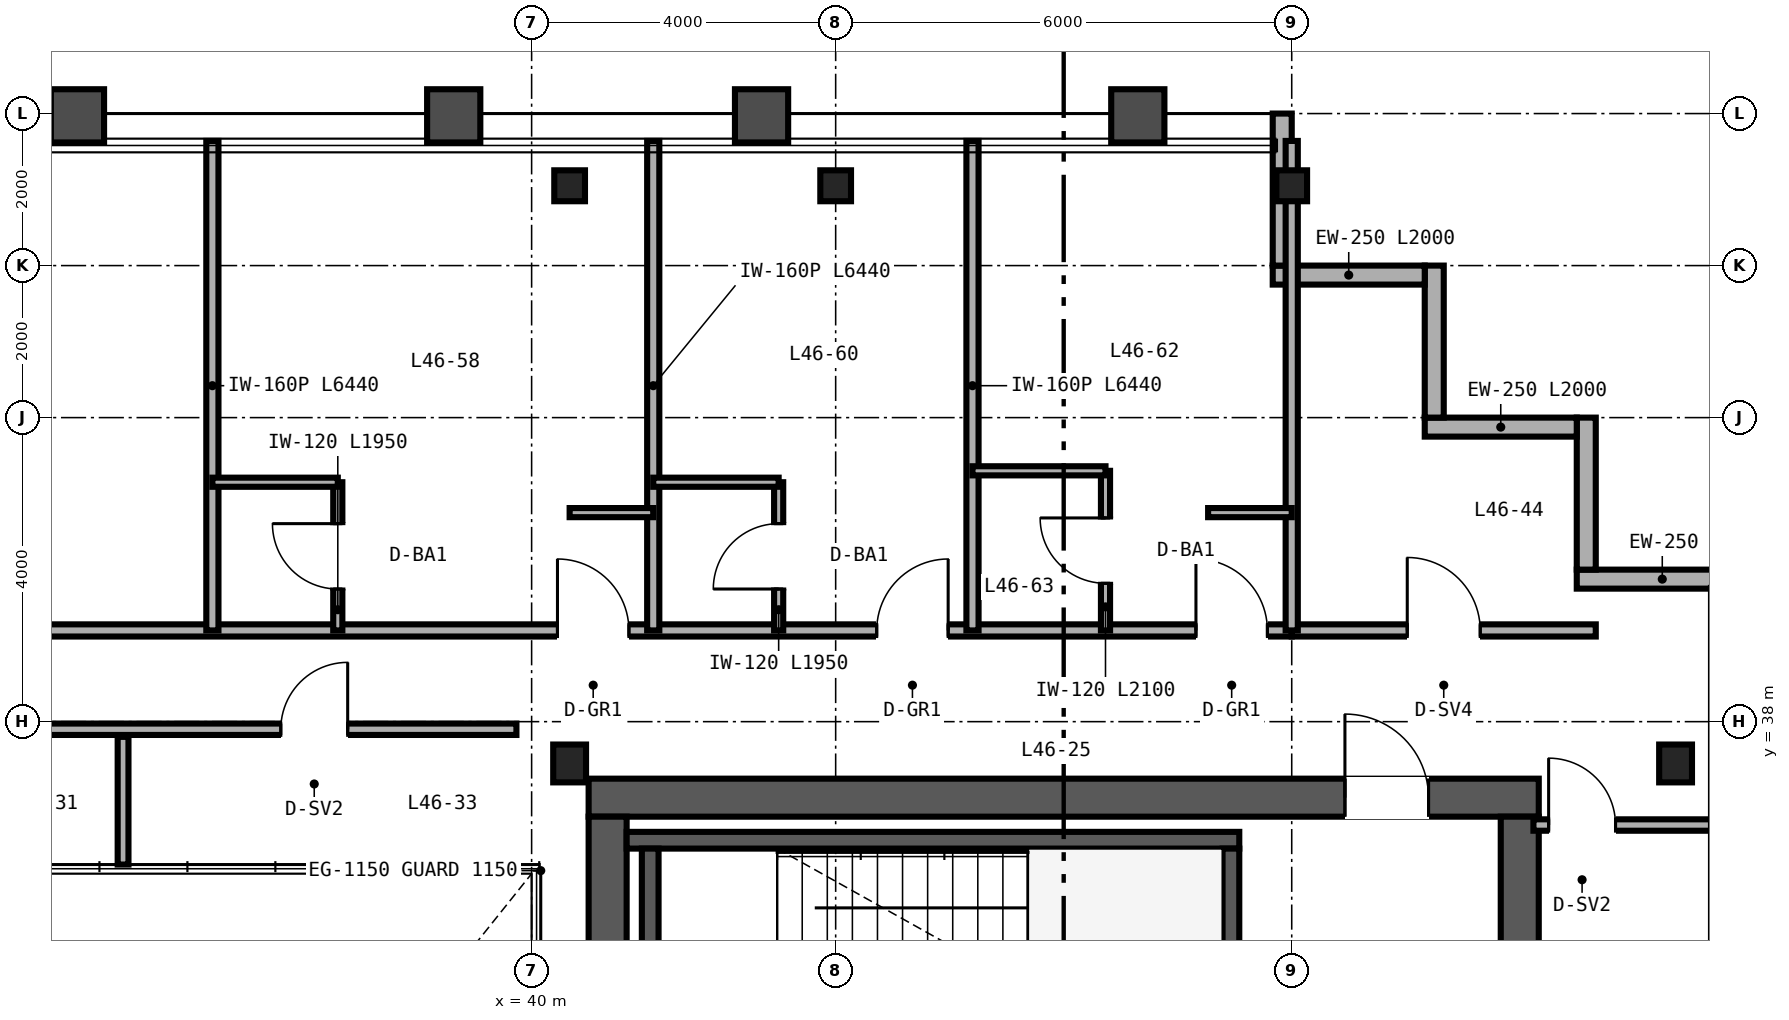
"""IFC4 building model, lengths in metres.
Left out: names, types, materials, properties, quantities, classifications, styles, units other than length and angle.
Written with IfcOpenShell. Run it as: python <this file> out.ifc"""

import sys

from ifc_helpers import new_model, si_unit, direction, frame, frame_2d, origin, origin_2d, place, context, subcontext, project, spatial, rectangle, i_section, extrude, source, transform, mapped, element, fill, save


model = new_model("IFC4")
c1 = context("Model", 3, precision=1e-05, world=origin(), true_north=direction((0.0, 1.0)))
c2 = subcontext(c1, "Body", "Model", "MODEL_VIEW")
j1 = project(units=[si_unit("LENGTHUNIT", "METRE"), si_unit("PLANEANGLEUNIT", "RADIAN")], contexts=[c1])
p1 = place(None, origin())
s1 = spatial("IfcSite", under=j1, at=p1, CompositionType="ELEMENT")
p2 = place(p1, origin())
s2 = spatial("IfcBuilding", under=s1, at=p2, CompositionType="ELEMENT")
p3 = place(p2, frame((0.0, 0.0, 184.8)))
s3 = spatial("IfcBuildingStorey", under=s2, at=p3, CompositionType="ELEMENT", Elevation=184.8)
p4 = place(p3, frame((40.75, 37.0, 0.0), z_axis=(0.0, 0.0, 1.0), x_axis=(1.0, 0.0, 0.0)))
e1 = element("IfcWall", 1, at=p4, inside=s3, PredefinedType="SHEAR", context=c2, shape_type="SweptSolid", body=[
    extrude(rectangle(XDim=12.5, YDim=0.5, at=frame_2d((6.25, 0.0))), origin(), (0.0, 0.0, 1.0), 3.37),
])
p5 = place(p4, frame((9.95, 0.0, 0.0)))
e2 = element("IfcOpeningElement", 2, at=p5, cuts=e1, PredefinedType="OPENING", context=c2, shape_type="SweptSolid", body=[
    extrude(rectangle(XDim=1.1, YDim=2.15, at=frame_2d((0.55, 1.075))), frame((0.0, 0.26, 0.0), z_axis=(0.0, -1.0, 0.0), x_axis=(1.0, 0.0, 0.0)), (0.0, 0.0, 1.0), 0.52),
])
for number, where, z_axis, x_axis in (
    (3, (41.0, 15.25, 0.0), (0.0, 0.0, 1.0), (0.0, 1.0, 0.0)),
    (4, (53.0, 15.25, 0.0), (0.0, 0.0, 1.0), (0.0, 1.0, 0.0)),
):
    element("IfcWall", number, at=place(p3, frame(where, z_axis=z_axis, x_axis=x_axis)), inside=s3, PredefinedType="SHEAR", context=c2, shape_type="SweptSolid", body=[
        extrude(rectangle(XDim=21.5, YDim=0.5, at=frame_2d((10.75, 0.0))), origin(), (0.0, 0.0, 1.0), 3.37),
    ])
p6 = place(p3, frame((41.25, 36.44, 0.0), z_axis=(0.0, 0.0, 1.0), x_axis=(1.0, 0.0, 0.0)))
e5 = element("IfcWall", 5, at=p6, inside=s3, PredefinedType="SHEAR", context=c2, shape_type="SweptSolid", body=[
    extrude(rectangle(XDim=8.06, YDim=0.22, at=frame_2d((4.03, 0.0))), origin(), (0.0, 0.0, 1.0), 3.4),
])
for number, where, z_axis, x_axis in (
    (6, (41.56, 33.05, 0.0), (0.0, 0.0, 1.0), (0.0, 1.0, 0.0)),
    (7, (49.2, 33.05, 0.0), (0.0, 0.0, 1.0), (0.0, 1.0, 0.0)),
):
    element("IfcWall", number, at=place(p3, frame(where, z_axis=z_axis, x_axis=x_axis)), inside=s3, PredefinedType="SHEAR", context=c2, shape_type="SweptSolid", body=[
        extrude(rectangle(XDim=3.28, YDim=0.22, at=frame_2d((1.64, 0.0))), origin(), (0.0, 0.0, 1.0), 3.4),
    ])
m1 = source(origin(), c2, "Body", "SweptSolid", [
    extrude(i_section(OverallWidth=0.432, OverallDepth=0.498, WebThickness=0.056, FlangeThickness=0.089, FilletRadius=0.025, at=origin_2d()), origin(), (0.0, 0.0, 1.0), 3.37),
])
for number, where, z_axis, x_axis in (
    (8, (40.5, 37.45, 0.0), (0.0, 0.0, 1.0), (1.0, 0.0, 0.0)),
    (9, (55.05, 37.45, 0.0), (0.0, 0.0, 1.0), (1.0, 0.0, 0.0)),
):
    element("IfcColumn", number, at=place(p3, frame(where, z_axis=z_axis, x_axis=x_axis)), inside=s3, PredefinedType="COLUMN", context=c2, shape_type="MappedRepresentation", body=[
        mapped(m1, transform((0.0, 0.0, 0.0), scale=1.0)),
    ])
m2 = source(origin(), c2, "Body", "SweptSolid", [
    extrude(i_section(OverallWidth=0.404, OverallDepth=0.407, WebThickness=0.027, FlangeThickness=0.044, FilletRadius=0.025, at=origin_2d()), origin(), (0.0, 0.0, 1.0), 3.37),
])
for number, where, z_axis, x_axis in (
    (10, (40.5, 45.05, 0.0), (0.0, 0.0, 1.0), (1.0, 0.0, 0.0)),
    (11, (44.0, 45.05, 0.0), (0.0, 0.0, 1.0), (1.0, 0.0, 0.0)),
    (12, (50.0, 45.05, 0.0), (0.0, 0.0, 1.0), (1.0, 0.0, 0.0)),
):
    element("IfcColumn", number, at=place(p3, frame(where, z_axis=z_axis, x_axis=x_axis)), inside=s3, PredefinedType="COLUMN", context=c2, shape_type="MappedRepresentation", body=[
        mapped(m2, transform((0.0, 0.0, 0.0), scale=1.0)),
    ])
p7 = place(p3, frame((56.0, 39.875, 0.0), z_axis=(0.0, 0.0, 1.0), x_axis=(-1.0, 0.0, 0.0)))
e13 = element("IfcWall", 13, at=p7, inside=s3, PredefinedType="SOLIDWALL", context=c2, shape_type="SweptSolid", body=[
    extrude(rectangle(XDim=2.25, YDim=0.25, at=frame_2d((1.125, 0.0))), origin(), (0.0, 0.0, 1.0), 3.37),
])
for number, where, z_axis, x_axis in (
    (14, (53.875, 40.0, 0.0), (0.0, 0.0, 1.0), (0.0, 1.0, 0.0)),
    (15, (53.75, 41.875, 0.0), (0.0, 0.0, 1.0), (-1.0, 0.0, 0.0)),
    (16, (51.875, 42.0, 0.0), (0.0, 0.0, 1.0), (0.0, 1.0, 0.0)),
    (17, (51.75, 43.875, 0.0), (0.0, 0.0, 1.0), (-1.0, 0.0, 0.0)),
):
    element("IfcWall", number, at=place(p3, frame(where, z_axis=z_axis, x_axis=x_axis)), inside=s3, PredefinedType="SOLIDWALL", context=c2, shape_type="SweptSolid", body=[
        extrude(rectangle(XDim=2.0, YDim=0.25, at=frame_2d((1.0, 0.0))), origin(), (0.0, 0.0, 1.0), 3.37),
    ])
p8 = place(p3, frame((49.875, 44.0, 0.0), z_axis=(0.0, 0.0, 1.0), x_axis=(0.0, 1.0, 0.0)))
e18 = element("IfcWall", 18, at=p8, inside=s3, PredefinedType="SOLIDWALL", context=c2, shape_type="SweptSolid", body=[
    extrude(rectangle(XDim=2.0, YDim=0.25, at=frame_2d((1.0, 0.0))), origin(), (0.0, 0.0, 1.0), 2.677),
])
p9 = place(p3, frame((24.2, 37.9, 0.0), z_axis=(0.0, 0.0, 1.0), x_axis=(1.0, 0.0, 0.0)))
e19 = element("IfcWall", 19, at=p9, inside=s3, PredefinedType="PARTITIONING", context=c2, shape_type="SweptSolid", body=[
    extrude(rectangle(XDim=15.6, YDim=0.15, at=frame_2d((7.8, 0.0))), origin(), (0.0, 0.0, 1.0), 3.37),
])
p10 = place(p9, frame((2.0, 0.0, 0.0)))
e20 = element("IfcOpeningElement", 20, at=p10, cuts=e19, PredefinedType="OPENING", context=c2, shape_type="SweptSolid", body=[
    extrude(rectangle(XDim=0.88, YDim=2.15, at=frame_2d((0.44, 1.075))), frame((0.0, 0.085, 0.0), z_axis=(0.0, -1.0, 0.0), x_axis=(1.0, 0.0, 0.0)), (0.0, 0.0, 1.0), 0.17),
])
p11 = place(p9, frame((7.25, 0.0, 0.0)))
e21 = element("IfcOpeningElement", 21, at=p11, cuts=e19, PredefinedType="OPENING", context=c2, shape_type="SweptSolid", body=[
    extrude(rectangle(XDim=0.88, YDim=2.15, at=frame_2d((0.44, 1.075))), frame((0.0, 0.085, 0.0), z_axis=(0.0, -1.0, 0.0), x_axis=(1.0, 0.0, 0.0)), (0.0, 0.0, 1.0), 0.17),
])
p12 = place(p9, frame((12.5, 0.0, 0.0)))
e22 = element("IfcOpeningElement", 22, at=p12, cuts=e19, PredefinedType="OPENING", context=c2, shape_type="SweptSolid", body=[
    extrude(rectangle(XDim=0.88, YDim=2.15, at=frame_2d((0.44, 1.075))), frame((0.0, 0.085, 0.0), z_axis=(0.0, -1.0, 0.0), x_axis=(1.0, 0.0, 0.0)), (0.0, 0.0, 1.0), 0.17),
])
p13 = place(p3, frame((34.625, 36.12, 0.0), z_axis=(0.0, 0.0, 1.0), x_axis=(0.0, 1.0, 0.0)))
e23 = element("IfcWall", 23, at=p13, inside=s3, PredefinedType="PARTITIONING", context=c2, shape_type="SweptSolid", body=[
    extrude(rectangle(XDim=1.68, YDim=0.142, at=frame_2d((0.84, 0.0))), origin(), (0.0, 0.0, 1.0), 3.37),
])
p14 = place(p3, frame((53.18, 36.64, 0.0), z_axis=(0.0, 0.0, 1.0), x_axis=(1.0, 0.0, 0.0)))
e24 = element("IfcWall", 24, at=p14, inside=s3, PredefinedType="PARTITIONING", context=c2, shape_type="SweptSolid", body=[
    extrude(rectangle(XDim=2.66, YDim=0.15, at=frame_2d((1.33, 0.0))), origin(), (0.0, 0.0, 1.0), 2.753),
])
p15 = place(p14, frame((0.2, 0.0, 0.0)))
e25 = element("IfcOpeningElement", 25, at=p15, cuts=e24, PredefinedType="OPENING", context=c2, shape_type="SweptSolid", body=[
    extrude(rectangle(XDim=0.88, YDim=2.15, at=frame_2d((0.44, 1.075))), frame((0.0, 0.085, 0.0), z_axis=(0.0, -1.0, 0.0), x_axis=(1.0, 0.0, 0.0)), (0.0, 0.0, 1.0), 0.17),
])
p16 = place(p3, frame((50.0, 39.2, 0.0), z_axis=(0.0, 0.0, 1.0), x_axis=(1.0, 0.0, 0.0)))
e26 = element("IfcWall", 26, at=p16, inside=s3, PredefinedType="PARTITIONING", context=c2, shape_type="SweptSolid", body=[
    extrude(rectangle(XDim=4.0, YDim=0.16, at=frame_2d((2.0, 0.0))), origin(), (0.0, 0.0, 1.0), 3.37),
])
p17 = place(p16, frame((1.52, 0.0, 0.0)))
e27 = element("IfcOpeningElement", 27, at=p17, cuts=e26, PredefinedType="OPENING", context=c2, shape_type="SweptSolid", body=[
    extrude(rectangle(XDim=0.96, YDim=2.15, at=frame_2d((0.48, 1.075))), frame((0.0, 0.09, 0.0), z_axis=(0.0, -1.0, 0.0), x_axis=(1.0, 0.0, 0.0)), (0.0, 0.0, 1.0), 0.18),
])
p18 = place(p3, frame((14.0, 39.2, 0.0), z_axis=(0.0, 0.0, 1.0), x_axis=(1.0, 0.0, 0.0)))
e28 = element("IfcWall", 28, at=p18, inside=s3, PredefinedType="PARTITIONING", context=c2, shape_type="SweptSolid", body=[
    extrude(rectangle(XDim=36.0, YDim=0.16, at=frame_2d((18.0, 0.0))), origin(), (0.0, 0.0, 1.0), 2.913),
])
p19 = place(p18, frame((3.94, 0.0, 0.0)))
e29 = element("IfcOpeningElement", 29, at=p19, cuts=e28, PredefinedType="OPENING", context=c2, shape_type="SweptSolid", body=[
    extrude(rectangle(XDim=0.94, YDim=2.15, at=frame_2d((0.47, 1.075))), frame((0.0, 0.09, 0.0), z_axis=(0.0, -1.0, 0.0), x_axis=(1.0, 0.0, 0.0)), (0.0, 0.0, 1.0), 0.18),
])
p20 = place(p18, frame((9.14, 0.0, 0.0)))
e30 = element("IfcOpeningElement", 30, at=p20, cuts=e28, PredefinedType="OPENING", context=c2, shape_type="SweptSolid", body=[
    extrude(rectangle(XDim=0.94, YDim=2.15, at=frame_2d((0.47, 1.075))), frame((0.0, 0.09, 0.0), z_axis=(0.0, -1.0, 0.0), x_axis=(1.0, 0.0, 0.0)), (0.0, 0.0, 1.0), 0.18),
])
p21 = place(p18, frame((12.72, 0.0, 0.0)))
e31 = element("IfcOpeningElement", 31, at=p21, cuts=e28, PredefinedType="OPENING", context=c2, shape_type="SweptSolid", body=[
    extrude(rectangle(XDim=0.96, YDim=2.15, at=frame_2d((0.48, 1.075))), frame((0.0, 0.09, 0.0), z_axis=(0.0, -1.0, 0.0), x_axis=(1.0, 0.0, 0.0)), (0.0, 0.0, 1.0), 0.18),
])
p22 = place(p18, frame((18.42, 0.0, 0.0)))
e32 = element("IfcOpeningElement", 32, at=p22, cuts=e28, PredefinedType="OPENING", context=c2, shape_type="SweptSolid", body=[
    extrude(rectangle(XDim=0.96, YDim=2.15, at=frame_2d((0.48, 1.075))), frame((0.0, 0.09, 0.0), z_axis=(0.0, -1.0, 0.0), x_axis=(1.0, 0.0, 0.0)), (0.0, 0.0, 1.0), 0.18),
])
p23 = place(p18, frame((26.34, 0.0, 0.0)))
e33 = element("IfcOpeningElement", 33, at=p23, cuts=e28, PredefinedType="OPENING", context=c2, shape_type="SweptSolid", body=[
    extrude(rectangle(XDim=0.94, YDim=2.15, at=frame_2d((0.47, 1.075))), frame((0.0, 0.09, 0.0), z_axis=(0.0, -1.0, 0.0), x_axis=(1.0, 0.0, 0.0)), (0.0, 0.0, 1.0), 0.18),
])
p24 = place(p18, frame((30.54, 0.0, 0.0)))
e34 = element("IfcOpeningElement", 34, at=p24, cuts=e28, PredefinedType="OPENING", context=c2, shape_type="SweptSolid", body=[
    extrude(rectangle(XDim=0.94, YDim=2.15, at=frame_2d((0.47, 1.075))), frame((0.0, 0.09, 0.0), z_axis=(0.0, -1.0, 0.0), x_axis=(1.0, 0.0, 0.0)), (0.0, 0.0, 1.0), 0.18),
])
p25 = place(p18, frame((34.74, 0.0, 0.0)))
e35 = element("IfcOpeningElement", 35, at=p25, cuts=e28, PredefinedType="OPENING", context=c2, shape_type="SweptSolid", body=[
    extrude(rectangle(XDim=0.94, YDim=2.15, at=frame_2d((0.47, 1.075))), frame((0.0, 0.09, 0.0), z_axis=(0.0, -1.0, 0.0), x_axis=(1.0, 0.0, 0.0)), (0.0, 0.0, 1.0), 0.18),
])
p26 = place(p3, frame((50.0, 39.2, 0.0), z_axis=(0.0, 0.0, 1.0), x_axis=(0.0, 1.0, 0.0)))
e36 = element("IfcWall", 36, at=p26, inside=s3, PredefinedType="PARTITIONING", context=c2, shape_type="SweptSolid", body=[
    extrude(rectangle(XDim=6.44, YDim=0.16, at=frame_2d((3.22, 0.0))), origin(), (0.0, 0.0, 1.0), 2.677),
])
p27 = place(p3, frame((35.8, 39.2, 0.0), z_axis=(0.0, 0.0, 1.0), x_axis=(0.0, 1.0, 0.0)))
e37 = element("IfcWall", 37, at=p27, inside=s3, PredefinedType="PARTITIONING", context=c2, shape_type="SweptSolid", body=[
    extrude(rectangle(XDim=6.44, YDim=0.16, at=frame_2d((3.22, 0.0))), origin(), (0.0, 0.0, 1.0), 2.443),
])
p28 = place(p3, frame((41.6, 39.2, 0.0), z_axis=(0.0, 0.0, 1.0), x_axis=(0.0, 1.0, 0.0)))
e38 = element("IfcWall", 38, at=p28, inside=s3, PredefinedType="PARTITIONING", context=c2, shape_type="SweptSolid", body=[
    extrude(rectangle(XDim=6.44, YDim=0.16, at=frame_2d((3.22, 0.0))), origin(), (0.0, 0.0, 1.0), 2.833),
])
p29 = place(p3, frame((37.45, 39.2, 0.0), z_axis=(0.0, 0.0, 1.0), x_axis=(0.0, 1.0, 0.0)))
e39 = element("IfcWall", 39, at=p29, inside=s3, PredefinedType="PARTITIONING", context=c2, shape_type="SweptSolid", body=[
    extrude(rectangle(XDim=1.95, YDim=0.12, at=frame_2d((0.975, 0.0))), origin(), (0.0, 0.0, 1.0), 3.37),
])
p30 = place(p29, frame((0.545, 0.0, 0.0)))
e40 = element("IfcOpeningElement", 40, at=p30, cuts=e39, PredefinedType="OPENING", context=c2, shape_type="SweptSolid", body=[
    extrude(rectangle(XDim=0.86, YDim=2.1, at=frame_2d((0.43, 1.05))), frame((0.0, 0.07, 0.0), z_axis=(0.0, -1.0, 0.0), x_axis=(1.0, 0.0, 0.0)), (0.0, 0.0, 1.0), 0.14),
])
p31 = place(p3, frame((35.8, 41.15, 0.0), z_axis=(0.0, 0.0, 1.0), x_axis=(1.0, 0.0, 0.0)))
e41 = element("IfcWall", 41, at=p31, inside=s3, PredefinedType="PARTITIONING", context=c2, shape_type="SweptSolid", body=[
    extrude(rectangle(XDim=1.65, YDim=0.12, at=frame_2d((0.825, 0.0))), origin(), (0.0, 0.0, 1.0), 3.37),
])
p32 = place(p3, frame((40.5, 40.75, 0.0), z_axis=(0.0, 0.0, 1.0), x_axis=(1.0, 0.0, 0.0)))
e42 = element("IfcWall", 42, at=p32, inside=s3, PredefinedType="PARTITIONING", context=c2, shape_type="SweptSolid", body=[
    extrude(rectangle(XDim=1.1, YDim=0.12, at=frame_2d((0.55, 0.0))), origin(), (0.0, 0.0, 1.0), 2.913),
])
p33 = place(p3, frame((45.8, 39.2, 0.0), z_axis=(0.0, 0.0, 1.0), x_axis=(0.0, 1.0, 0.0)))
e43 = element("IfcWall", 43, at=p33, inside=s3, PredefinedType="PARTITIONING", context=c2, shape_type="SweptSolid", body=[
    extrude(rectangle(XDim=6.44, YDim=0.16, at=frame_2d((3.22, 0.0))), origin(), (0.0, 0.0, 1.0), 2.677),
])
p34 = place(p3, frame((43.25, 39.2, 0.0), z_axis=(0.0, 0.0, 1.0), x_axis=(0.0, 1.0, 0.0)))
e44 = element("IfcWall", 44, at=p34, inside=s3, PredefinedType="PARTITIONING", context=c2, shape_type="SweptSolid", body=[
    extrude(rectangle(XDim=1.95, YDim=0.12, at=frame_2d((0.975, 0.0))), origin(), (0.0, 0.0, 1.0), 3.37),
])
p35 = place(p34, frame((0.545, 0.0, 0.0)))
e45 = element("IfcOpeningElement", 45, at=p35, cuts=e44, PredefinedType="OPENING", context=c2, shape_type="SweptSolid", body=[
    extrude(rectangle(XDim=0.86, YDim=2.1, at=frame_2d((0.43, 1.05))), frame((0.0, 0.07, 0.0), z_axis=(0.0, -1.0, 0.0), x_axis=(1.0, 0.0, 0.0)), (0.0, 0.0, 1.0), 0.14),
])
p36 = place(p3, frame((41.6, 41.15, 0.0), z_axis=(0.0, 0.0, 1.0), x_axis=(1.0, 0.0, 0.0)))
e46 = element("IfcWall", 46, at=p36, inside=s3, PredefinedType="PARTITIONING", context=c2, shape_type="SweptSolid", body=[
    extrude(rectangle(XDim=1.65, YDim=0.12, at=frame_2d((0.825, 0.0))), origin(), (0.0, 0.0, 1.0), 3.37),
])
p37 = place(p3, frame((47.55, 39.2, 0.0), z_axis=(0.0, 0.0, 1.0), x_axis=(0.0, 1.0, 0.0)))
e47 = element("IfcWall", 47, at=p37, inside=s3, PredefinedType="PARTITIONING", context=c2, shape_type="SweptSolid", body=[
    extrude(rectangle(XDim=2.1, YDim=0.12, at=frame_2d((1.05, 0.0))), origin(), (0.0, 0.0, 1.0), 3.37),
])
p38 = place(p37, frame((0.62, 0.0, 0.0)))
e48 = element("IfcOpeningElement", 48, at=p38, cuts=e47, PredefinedType="OPENING", context=c2, shape_type="SweptSolid", body=[
    extrude(rectangle(XDim=0.86, YDim=2.1, at=frame_2d((0.43, 1.05))), frame((0.0, 0.07, 0.0), z_axis=(0.0, -1.0, 0.0), x_axis=(1.0, 0.0, 0.0)), (0.0, 0.0, 1.0), 0.14),
])
p39 = place(p3, frame((45.8, 41.3, 0.0), z_axis=(0.0, 0.0, 1.0), x_axis=(1.0, 0.0, 0.0)))
e49 = element("IfcWall", 49, at=p39, inside=s3, PredefinedType="PARTITIONING", context=c2, shape_type="SweptSolid", body=[
    extrude(rectangle(XDim=1.75, YDim=0.12, at=frame_2d((0.875, 0.0))), origin(), (0.0, 0.0, 1.0), 3.37),
])
p40 = place(p3, frame((48.9, 40.75, 0.0), z_axis=(0.0, 0.0, 1.0), x_axis=(1.0, 0.0, 0.0)))
e50 = element("IfcWall", 50, at=p40, inside=s3, PredefinedType="PARTITIONING", context=c2, shape_type="SweptSolid", body=[
    extrude(rectangle(XDim=1.1, YDim=0.12, at=frame_2d((0.55, 0.0))), origin(), (0.0, 0.0, 1.0), 3.37),
])
m3 = source(origin(), c2, "Body", "SweptSolid", [
    extrude(rectangle(XDim=1.1, YDim=2.15, at=frame_2d((0.55, 1.075))), frame((0.0, 0.025, 0.0), z_axis=(0.0, -1.0, 0.0), x_axis=(1.0, 0.0, 0.0)), (0.0, 0.0, 1.0), 0.05),
])
p41 = place(p5, origin())
e51 = element("IfcDoor", 51, at=p41, inside=s3, OperationType="SINGLE_SWING_LEFT", PredefinedType="DOOR", context=c2, shape_type="MappedRepresentation", body=[
    mapped(m3, transform((0.0, 0.0, 0.0), scale=1.0)),
])
fill(e2, e51)
m4 = source(origin(), c2, "Body", "SweptSolid", [
    extrude(rectangle(XDim=0.88, YDim=2.15, at=frame_2d((0.44, 1.075))), frame((0.0, 0.025, 0.0), z_axis=(0.0, -1.0, 0.0), x_axis=(1.0, 0.0, 0.0)), (0.0, 0.0, 1.0), 0.05),
])
p42 = place(p12, origin())
e52 = element("IfcDoor", 52, at=p42, inside=s3, OperationType="SINGLE_SWING_RIGHT", PredefinedType="DOOR", context=c2, shape_type="MappedRepresentation", body=[
    mapped(m4, transform((0.0, 0.0, 0.0), scale=1.0)),
])
fill(e22, e52)
p43 = place(p15, origin())
e53 = element("IfcDoor", 53, at=p43, inside=s3, OperationType="SINGLE_SWING_LEFT", PredefinedType="DOOR", context=c2, shape_type="MappedRepresentation", body=[
    mapped(m4, transform((0.0, 0.0, 0.0), scale=1.0)),
])
fill(e25, e53)
m5 = source(origin(), c2, "Body", "SweptSolid", [
    extrude(rectangle(XDim=0.96, YDim=2.15, at=frame_2d((0.48, 1.075))), frame((0.0, 0.025, 0.0), z_axis=(0.0, -1.0, 0.0), x_axis=(1.0, 0.0, 0.0)), (0.0, 0.0, 1.0), 0.05),
])
p44 = place(p17, origin())
e54 = element("IfcDoor", 54, at=p44, inside=s3, OperationType="SINGLE_SWING_LEFT", PredefinedType="DOOR", context=c2, shape_type="MappedRepresentation", body=[
    mapped(m5, transform((0.0, 0.0, 0.0), scale=1.0)),
])
fill(e27, e54)
m6 = source(origin(), c2, "Body", "SweptSolid", [
    extrude(rectangle(XDim=0.86, YDim=2.1, at=frame_2d((0.43, 1.05))), frame((0.0, 0.025, 0.0), z_axis=(0.0, -1.0, 0.0), x_axis=(1.0, 0.0, 0.0)), (0.0, 0.0, 1.0), 0.05),
])
p45 = place(p30, origin())
e55 = element("IfcDoor", 55, at=p45, inside=s3, OperationType="SINGLE_SWING_RIGHT", PredefinedType="DOOR", context=c2, shape_type="MappedRepresentation", body=[
    mapped(m6, transform((0.0, 0.0, 0.0), scale=1.0)),
])
fill(e40, e55)
p46 = place(p35, origin())
e56 = element("IfcDoor", 56, at=p46, inside=s3, OperationType="SINGLE_SWING_LEFT", PredefinedType="DOOR", context=c2, shape_type="MappedRepresentation", body=[
    mapped(m6, transform((0.0, 0.0, 0.0), scale=1.0)),
])
fill(e45, e56)
p47 = place(p38, origin())
e57 = element("IfcDoor", 57, at=p47, inside=s3, OperationType="SINGLE_SWING_RIGHT", PredefinedType="DOOR", context=c2, shape_type="MappedRepresentation", body=[
    mapped(m6, transform((0.0, 0.0, 0.0), scale=1.0)),
])
fill(e48, e57)
m7 = source(origin(), c2, "Body", "SweptSolid", [
    extrude(rectangle(XDim=0.94, YDim=2.15, at=frame_2d((0.47, 1.075))), frame((0.0, 0.025, 0.0), z_axis=(0.0, -1.0, 0.0), x_axis=(1.0, 0.0, 0.0)), (0.0, 0.0, 1.0), 0.05),
])
p48 = place(p23, origin())
e58 = element("IfcDoor", 58, at=p48, inside=s3, OperationType="SINGLE_SWING_LEFT", PredefinedType="DOOR", context=c2, shape_type="MappedRepresentation", body=[
    mapped(m7, transform((0.0, 0.0, 0.0), scale=1.0)),
])
fill(e33, e58)
p49 = place(p24, origin())
e59 = element("IfcDoor", 59, at=p49, inside=s3, OperationType="SINGLE_SWING_RIGHT", PredefinedType="DOOR", context=c2, shape_type="MappedRepresentation", body=[
    mapped(m7, transform((0.0, 0.0, 0.0), scale=1.0)),
])
fill(e34, e59)
p50 = place(p25, origin())
e60 = element("IfcDoor", 60, at=p50, inside=s3, OperationType="SINGLE_SWING_LEFT", PredefinedType="DOOR", context=c2, shape_type="MappedRepresentation", body=[
    mapped(m7, transform((0.0, 0.0, 0.0), scale=1.0)),
])
fill(e35, e60)
save(model, sys.argv[1])
